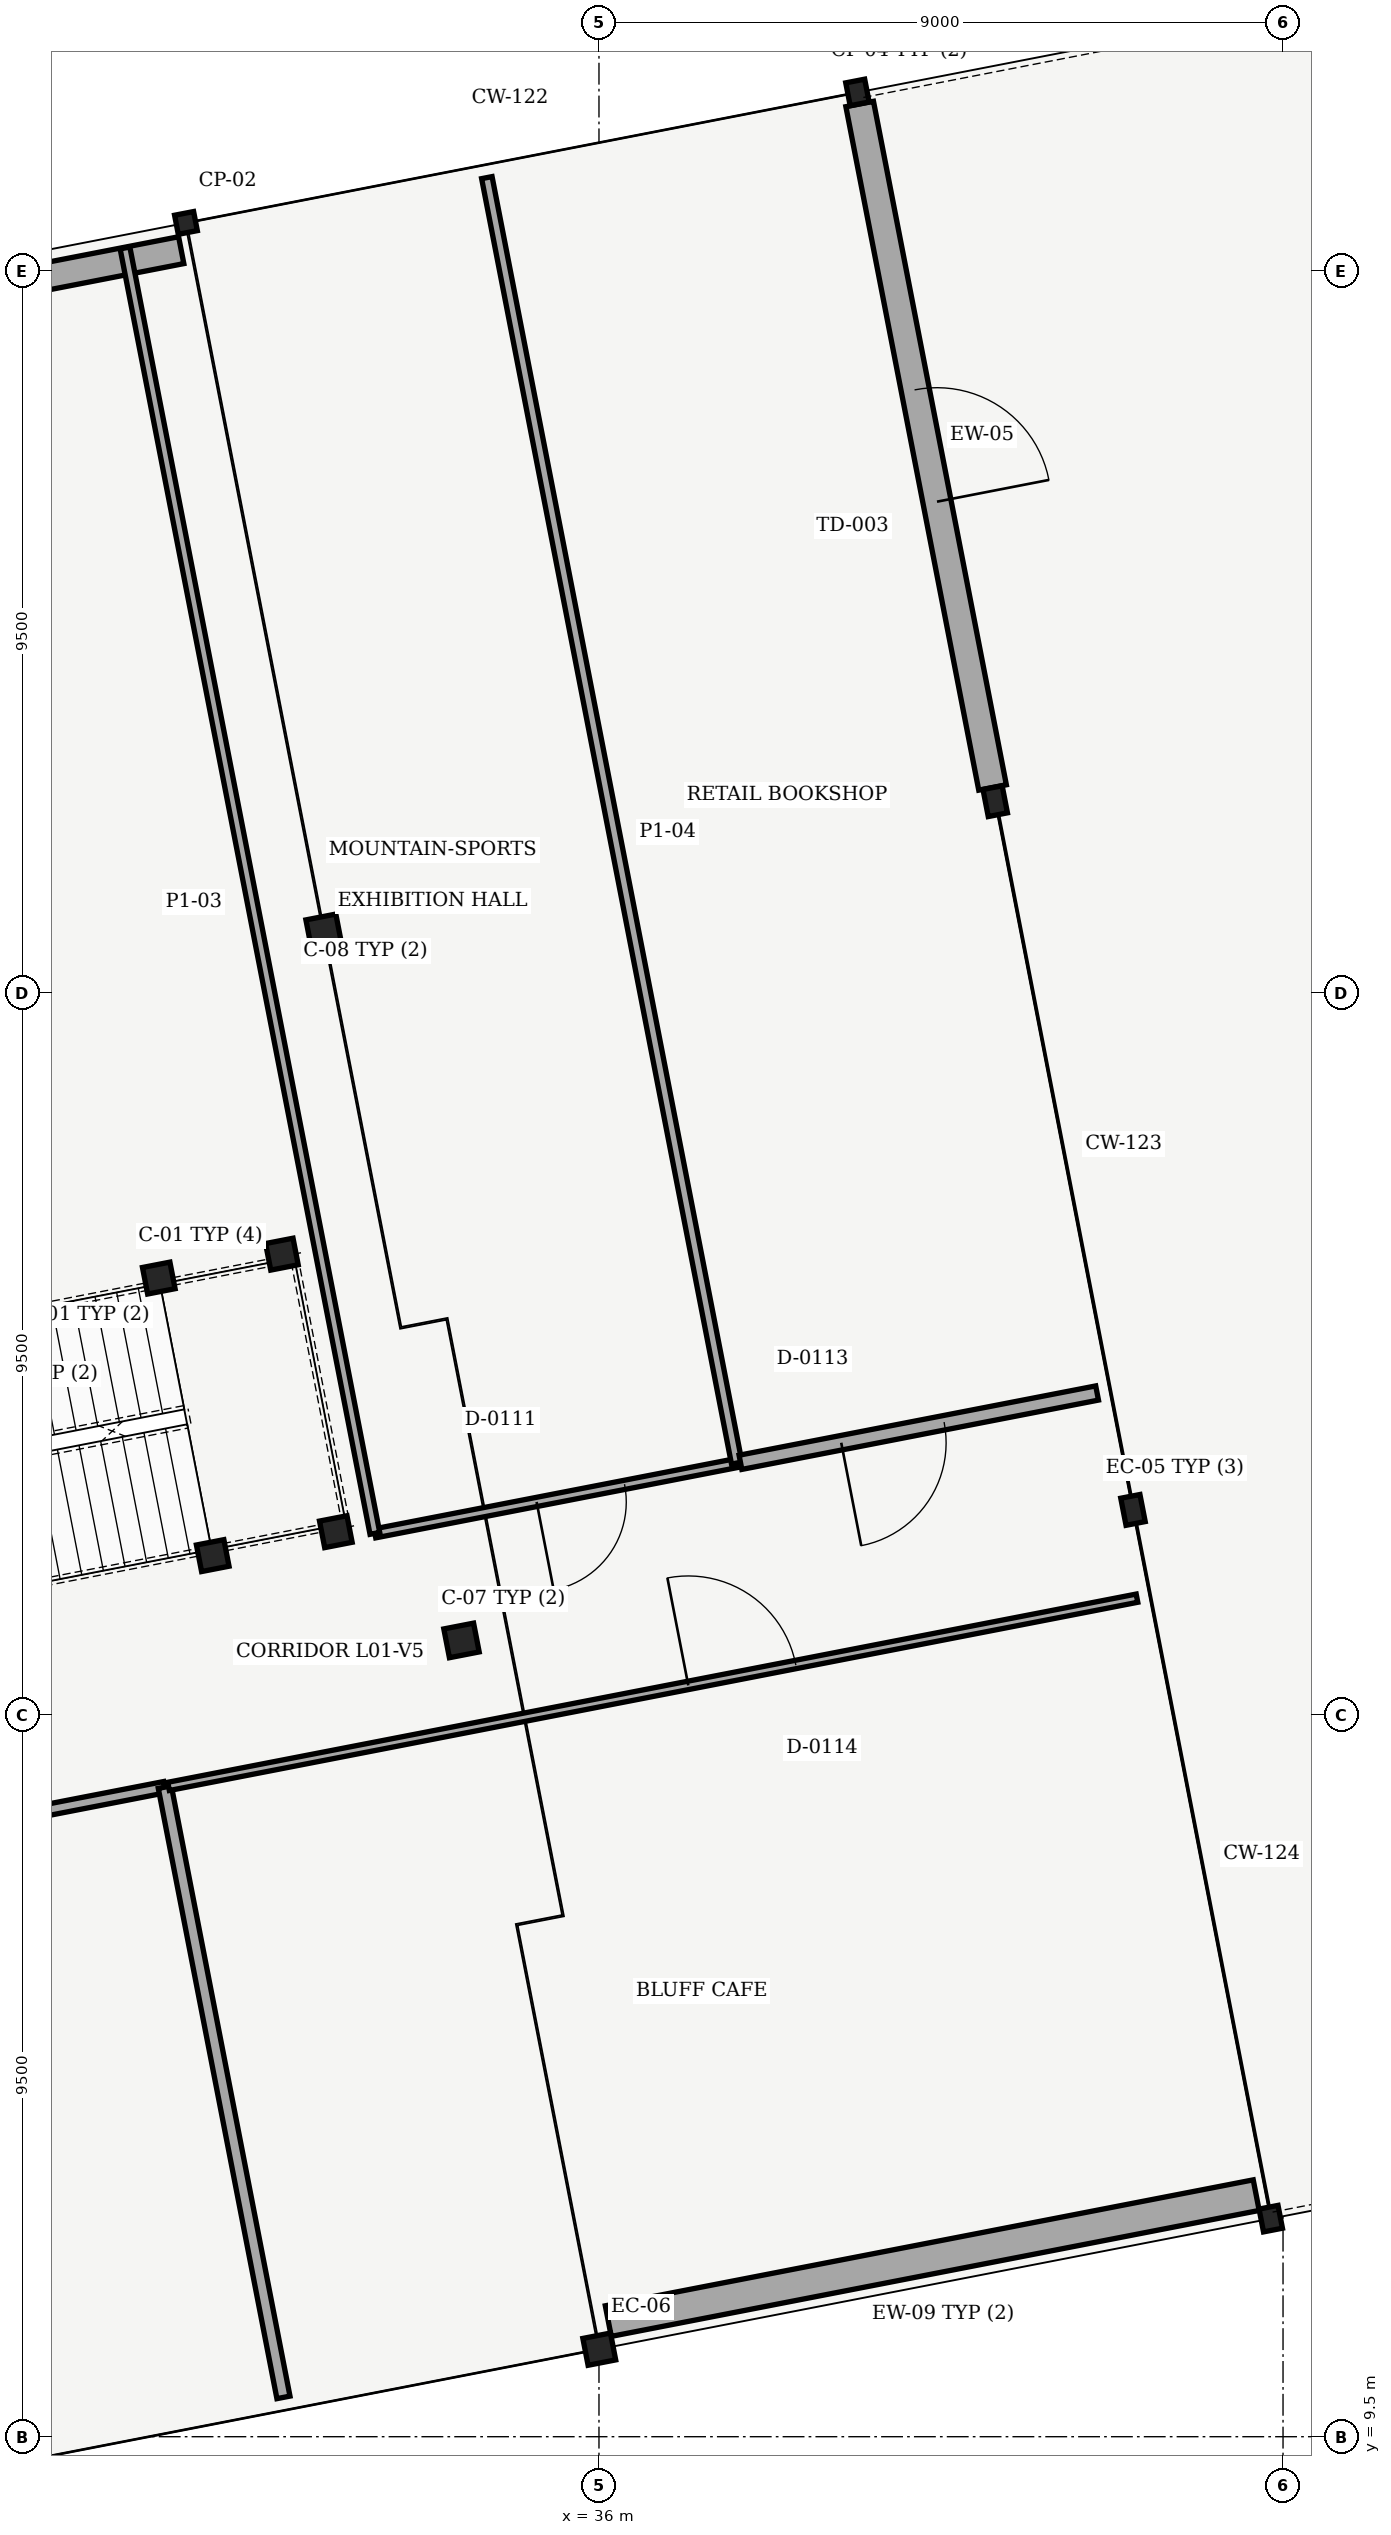
"""IFC4 building model, lengths in metres.
Left out: names, types, materials, properties, quantities, classifications, styles, units other than length and angle.
Written with IfcOpenShell. Run it as: python <this file> out.ifc"""

import sys

from ifc_helpers import new_model, si_unit, direction, frame, frame_2d, origin, origin_with_axes, origin_2d, place, context, subcontext, project, spatial, rectangle, i_section, extrude, element, fill, save


model = new_model("IFC4")
c1 = context("Model", 3, precision=1e-05, world=origin(), true_north=direction((0.0, 1.0)))
c2 = subcontext(c1, "Body", "Model", "MODEL_VIEW")
j1 = project(units=[si_unit("LENGTHUNIT", "METRE"), si_unit("PLANEANGLEUNIT", "RADIAN")], contexts=[c1])
p1 = place(None, origin())
s1 = spatial("IfcSite", under=j1, at=p1, CompositionType="ELEMENT")
p2 = place(p1, origin())
s2 = spatial("IfcBuilding", under=s1, at=p2, CompositionType="ELEMENT")
p3 = place(p2, frame((0.0, 0.0, 4.8)))
s3 = spatial("IfcBuildingStorey", under=s2, at=p3, CompositionType="ELEMENT", Elevation=4.8)
p4 = place(p3, frame((36.004, 10.652, 0.0), z_axis=(0.0, 0.0, 1.0), x_axis=(0.981627183448, 0.190808995377, 0.0)))
e1 = element("IfcColumn", 1, at=p4, inside=s3, PredefinedType="COLUMN", context=c2, shape_type="SweptSolid", body=[
    extrude(i_section(OverallWidth=0.37, OverallDepth=0.36, WebThickness=0.012, FlangeThickness=0.02, FilletRadius=0.015, at=origin_2d()), origin(), (0.0, 0.0, 1.0), 4.8),
])
p5 = place(p3, frame((34.191, 19.977, 0.0), z_axis=(0.0, 0.0, 1.0), x_axis=(0.981627183448, 0.190808995377, 0.0)))
e2 = element("IfcColumn", 2, at=p5, inside=s3, PredefinedType="COLUMN", context=c2, shape_type="SweptSolid", body=[
    extrude(i_section(OverallWidth=0.399, OverallDepth=0.386, WebThickness=0.021, FlangeThickness=0.033, FilletRadius=0.015, at=origin_2d()), origin(), (0.0, 0.0, 1.0), 4.8),
])
p6 = place(p3, frame((32.379, 29.303, 0.0), z_axis=(0.0, 0.0, 1.0), x_axis=(0.981627183448, 0.190808995377, 0.0)))
e3 = element("IfcColumn", 3, at=p6, inside=s3, PredefinedType="COLUMN", context=c2, shape_type="SweptSolid", body=[
    extrude(i_section(OverallWidth=0.401, OverallDepth=0.394, WebThickness=0.023, FlangeThickness=0.037, FilletRadius=0.015, at=origin_2d()), origin(), (0.0, 0.0, 1.0), 4.8),
])
p7 = place(p3, frame((30.566, 38.628, 0.0), z_axis=(0.0, 0.0, 1.0), x_axis=(0.981627183448, 0.190808995377, 0.0)))
e4 = element("IfcColumn", 4, at=p7, inside=s3, PredefinedType="PILASTER", context=c2, shape_type="SweptSolid", body=[
    extrude(i_section(OverallWidth=0.255, OverallDepth=0.256, WebThickness=0.01, FlangeThickness=0.016, FilletRadius=0.009, at=origin_2d()), origin(), (0.0, 0.0, 1.0), 4.8),
])
p8 = place(p3, frame((44.839, 12.369, 0.0), z_axis=(0.0, 0.0, 1.0), x_axis=(0.981627183448, 0.190808995377, 0.0)))
e5 = element("IfcColumn", 5, at=p8, inside=s3, PredefinedType="PILASTER", context=c2, shape_type="SweptSolid", body=[
    extrude(i_section(OverallWidth=0.254, OverallDepth=0.306, WebThickness=0.009, FlangeThickness=0.015, FilletRadius=0.011, at=origin_2d()), origin(), (0.0, 0.0, 1.0), 4.8),
])
for number, where, z_axis, x_axis in (
    (6, (43.026, 21.695, 0.0), (0.0, 0.0, 1.0), (0.982, 0.191, 0.0)),
    (7, (41.213, 31.02, 0.0), (0.0, 0.0, 1.0), (0.982, 0.191, 0.0)),
):
    element("IfcColumn", number, at=place(p3, frame(where, z_axis=z_axis, x_axis=x_axis)), inside=s3, PredefinedType="COLUMN", context=c2, shape_type="SweptSolid", body=[
        extrude(i_section(OverallWidth=0.257, OverallDepth=0.363, WebThickness=0.013, FlangeThickness=0.022, FilletRadius=0.015, at=origin_2d()), origin(), (0.0, 0.0, 1.0), 4.8),
    ])
p9 = place(p3, frame((39.401, 40.345, 0.0), z_axis=(0.0, 0.0, 1.0), x_axis=(0.981627183448, 0.190808995377, 0.0)))
e8 = element("IfcColumn", 8, at=p9, inside=s3, PredefinedType="PILASTER", context=c2, shape_type="SweptSolid", body=[
    extrude(i_section(OverallWidth=0.254, OverallDepth=0.306, WebThickness=0.009, FlangeThickness=0.015, FilletRadius=0.011, at=origin_2d()), origin(), (0.0, 0.0, 1.0), 4.8),
])
p10 = place(p3, frame((44.647, 12.678, 0.0), z_axis=(0.0, 0.0, 1.0), x_axis=(-0.981627093264, -0.19080945933, 0.0)))
e9 = element("IfcWall", 9, at=p10, inside=s3, PredefinedType="SOLIDWALL", context=c2, shape_type="SweptSolid", body=[
    extrude(rectangle(XDim=8.684, YDim=0.41, at=frame_2d((4.342, 0.0))), origin(), (0.0, 0.0, 1.0), 3.4),
])
p11 = place(p3, frame((21.98, 36.613, 0.0), z_axis=(0.0, 0.0, 1.0), x_axis=(0.981625045934, 0.190819991601, 0.0)))
e10 = element("IfcWall", 10, at=p11, inside=s3, PredefinedType="SOLIDWALL", context=c2, shape_type="SweptSolid", body=[
    extrude(rectangle(XDim=8.684, YDim=0.36, at=frame_2d((4.342, 0.0))), origin(), (0.0, 0.0, 1.0), 3.4),
])
p12 = place(p3, frame((39.43, 40.193, 0.0), z_axis=(0.0, 0.0, 1.0), x_axis=(0.190804037715, -0.981628147106, 0.0)))
e11 = element("IfcWall", 11, at=p12, inside=s3, PredefinedType="SOLIDWALL", context=c2, shape_type="SweptSolid", body=[
    extrude(rectangle(XDim=9.161, YDim=0.37, at=frame_2d((4.581, 0.0))), origin(), (0.0, 0.0, 1.0), 3.4),
])
p13 = place(p12, frame((3.831, 0.0, 0.0)))
e12 = element("IfcOpeningElement", 12, at=p13, cuts=e11, PredefinedType="OPENING", context=c2, shape_type="SweptSolid", body=[
    extrude(rectangle(XDim=1.5, YDim=2.15, at=frame_2d((0.75, 1.075))), frame((0.0, 0.195, 0.0), z_axis=(0.0, -1.0, 0.0), x_axis=(1.0, 0.0, 0.0)), (0.0, 0.0, 1.0), 0.39),
])
for number, where, z_axis, x_axis in (
    (13, (30.918, 21.093, 0.0), (0.0, 0.0, 1.0), (0.982, 0.191, 0.0)),
    (14, (32.538, 21.408, 0.0), (0.0, 0.0, 1.0), (0.982, 0.191, 0.0)),
    (15, (30.208, 24.745, 0.0), (0.0, 0.0, 1.0), (0.982, 0.191, 0.0)),
    (16, (31.828, 25.06, 0.0), (0.0, 0.0, 1.0), (0.982, 0.191, 0.0)),
):
    element("IfcColumn", number, at=place(p3, frame(where, z_axis=z_axis, x_axis=x_axis)), inside=s3, PredefinedType="COLUMN", context=c2, shape_type="SweptSolid", body=[
        extrude(i_section(OverallWidth=0.368, OverallDepth=0.356, WebThickness=0.011, FlangeThickness=0.018, FilletRadius=0.015, at=origin_2d()), origin(), (0.0, 0.0, 1.0), 2.2),
    ])
p14 = place(p3, frame((37.812, 22.311, 0.0), z_axis=(0.0, 0.0, 1.0), x_axis=(-0.981632938172, -0.190779387502, 0.0)))
e17 = element("IfcWall", 17, at=p14, inside=s3, PredefinedType="PARTITIONING", context=c2, shape_type="SweptSolid", body=[
    extrude(rectangle(XDim=4.85, YDim=0.12, at=frame_2d((2.425, 0.0))), origin(), (0.0, 0.0, 1.0), 3.38),
])
p15 = place(p14, frame((1.503, 0.0, 0.0)))
e18 = element("IfcOpeningElement", 18, at=p15, cuts=e17, PredefinedType="OPENING", context=c2, shape_type="SweptSolid", body=[
    extrude(rectangle(XDim=1.18, YDim=2.18, at=frame_2d((0.59, 1.09))), frame((0.0, 0.07, 0.0), z_axis=(0.0, -1.0, 0.0), x_axis=(1.0, 0.0, 0.0)), (0.0, 0.0, 1.0), 0.14),
])
p16 = place(p3, frame((33.052, 21.386, 0.0), z_axis=(0.0, 0.0, 1.0), x_axis=(-0.190807839233, 0.981627408179, 0.0)))
e19 = element("IfcWall", 19, at=p16, inside=s3, PredefinedType="PARTITIONING", context=c2, shape_type="SweptSolid", body=[
    extrude(rectangle(XDim=17.23, YDim=0.13, at=frame_2d((8.615, 0.0))), origin(), (0.0, 0.0, 1.0), 3.38),
])
p17 = place(p3, frame((34.525, 39.225, 0.0), z_axis=(0.0, 0.0, 1.0), x_axis=(0.190805185272, -0.981627924049, 0.0)))
e20 = element("IfcWall", 20, at=p17, inside=s3, PredefinedType="PARTITIONING", context=c2, shape_type="SweptSolid", body=[
    extrude(rectangle(XDim=17.23, YDim=0.14, at=frame_2d((8.615, 0.0))), origin(), (0.0, 0.0, 1.0), 3.38),
])
p18 = place(p3, frame((16.791, 15.423, 0.0), z_axis=(0.0, 0.0, 1.0), x_axis=(0.981624906569, 0.190820708527, 0.0)))
e21 = element("IfcWall", 21, at=p18, inside=s3, PredefinedType="PARTITIONING", context=c2, shape_type="SweptSolid", body=[
    extrude(rectangle(XDim=13.75, YDim=0.15, at=frame_2d((6.875, 0.0))), origin(), (0.0, 0.0, 1.0), 3.38),
])
p19 = place(p18, frame((4.831, 0.0, 0.0)))
e22 = element("IfcOpeningElement", 22, at=p19, cuts=e21, PredefinedType="OPENING", context=c2, shape_type="SweptSolid", body=[
    extrude(rectangle(XDim=1.32, YDim=2.22, at=frame_2d((0.66, 1.11))), frame((0.0, 0.085, 0.0), z_axis=(0.0, -1.0, 0.0), x_axis=(1.0, 0.0, 0.0)), (0.0, 0.0, 1.0), 0.17),
])
p20 = place(p3, frame((30.288, 18.047, 0.0), z_axis=(0.0, 0.0, 1.0), x_axis=(0.190804153264, -0.981628124647, 0.0)))
e23 = element("IfcWall", 23, at=p20, inside=s3, PredefinedType="PARTITIONING", context=c2, shape_type="SweptSolid", body=[
    extrude(rectangle(XDim=8.18, YDim=0.175, at=frame_2d((4.09, 0.0))), origin(), (0.0, 0.0, 1.0), 3.38),
])
p21 = place(p3, frame((42.554, 23.233, 0.0), z_axis=(0.0, 0.0, 1.0), x_axis=(-0.98163478978, -0.190769860025, 0.0)))
e24 = element("IfcWall", 24, at=p21, inside=s3, PredefinedType="PARTITIONING", context=c2, shape_type="SweptSolid", body=[
    extrude(rectangle(XDim=4.78, YDim=0.19, at=frame_2d((2.39, 0.0))), origin(), (0.0, 0.0, 1.0), 3.38),
])
p22 = place(p21, frame((2.049, 0.0, 0.0)))
e25 = element("IfcOpeningElement", 25, at=p22, cuts=e24, PredefinedType="OPENING", context=c2, shape_type="SweptSolid", body=[
    extrude(rectangle(XDim=1.38, YDim=2.22, at=frame_2d((0.69, 1.11))), frame((0.0, 0.105, 0.0), z_axis=(0.0, -1.0, 0.0), x_axis=(1.0, 0.0, 0.0)), (0.0, 0.0, 1.0), 0.21),
])
p23 = place(p3, frame((30.337, 18.057, 0.0), z_axis=(0.0, 0.0, 1.0), x_axis=(0.981628994067, 0.190799680312, 0.0)))
e26 = element("IfcWall", 26, at=p23, inside=s3, PredefinedType="PARTITIONING", context=c2, shape_type="SweptSolid", body=[
    extrude(rectangle(XDim=12.98, YDim=0.11, at=frame_2d((6.49, 0.0))), origin(), (0.0, 0.0, 1.0), 3.38),
])
p24 = place(p23, frame((6.966, 0.0, 0.0)))
e27 = element("IfcOpeningElement", 27, at=p24, cuts=e26, PredefinedType="OPENING", context=c2, shape_type="SweptSolid", body=[
    extrude(rectangle(XDim=1.44, YDim=2.22, at=frame_2d((0.72, 1.11))), frame((0.0, 0.065, 0.0), z_axis=(0.0, -1.0, 0.0), x_axis=(1.0, 0.0, 0.0)), (0.0, 0.0, 1.0), 0.13),
])
p25 = place(p13, origin_with_axes())
e28 = element("IfcDoor", 28, at=p25, inside=s3, OperationType="SINGLE_SWING_RIGHT", PredefinedType="DOOR", context=c2, shape_type="SweptSolid", body=[
    extrude(rectangle(XDim=1.5, YDim=2.15, at=frame_2d((0.75, 1.075))), frame((0.0, 0.025, 0.0), z_axis=(0.0, -1.0, 0.0), x_axis=(1.0, 0.0, 0.0)), (0.0, 0.0, 1.0), 0.05),
])
fill(e12, e28)
p26 = place(p15, origin_with_axes())
e29 = element("IfcDoor", 29, at=p26, inside=s3, OperationType="SINGLE_SWING_RIGHT", PredefinedType="DOOR", context=c2, shape_type="SweptSolid", body=[
    extrude(rectangle(XDim=1.18, YDim=2.18, at=frame_2d((0.59, 1.09))), frame((0.0, 0.025, 0.0), z_axis=(0.0, -1.0, 0.0), x_axis=(1.0, 0.0, 0.0)), (0.0, 0.0, 1.0), 0.05),
])
fill(e18, e29)
p27 = place(p22, origin_with_axes())
e30 = element("IfcDoor", 30, at=p27, inside=s3, OperationType="SINGLE_SWING_RIGHT", PredefinedType="DOOR", context=c2, shape_type="SweptSolid", body=[
    extrude(rectangle(XDim=1.38, YDim=2.22, at=frame_2d((0.69, 1.11))), frame((0.0, 0.025, 0.0), z_axis=(0.0, -1.0, 0.0), x_axis=(1.0, 0.0, 0.0)), (0.0, 0.0, 1.0), 0.05),
])
fill(e25, e30)
p28 = place(p24, origin_with_axes())
e31 = element("IfcDoor", 31, at=p28, inside=s3, OperationType="SINGLE_SWING_LEFT", PredefinedType="DOOR", context=c2, shape_type="SweptSolid", body=[
    extrude(rectangle(XDim=1.44, YDim=2.22, at=frame_2d((0.72, 1.11))), frame((0.0, 0.025, 0.0), z_axis=(0.0, -1.0, 0.0), x_axis=(1.0, 0.0, 0.0)), (0.0, 0.0, 1.0), 0.05),
])
fill(e27, e31)
save(model, sys.argv[1])
